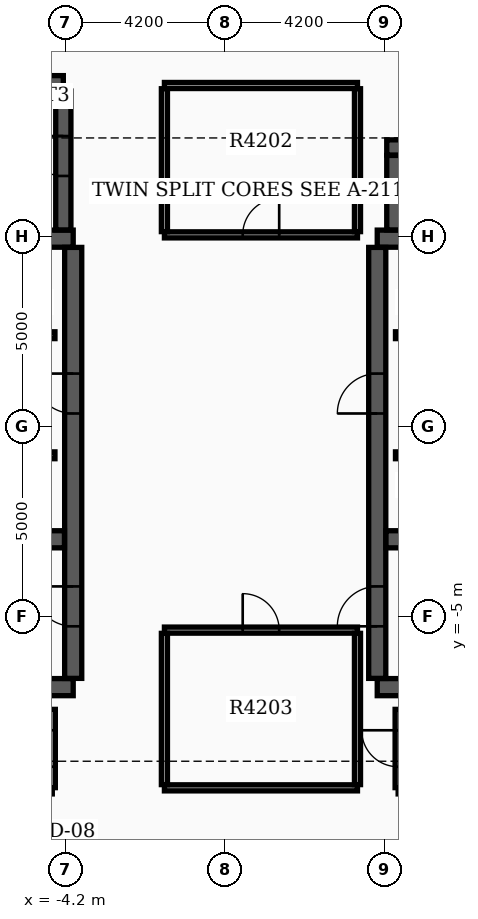
"""IFC4 building model, lengths in metres.
Left out: names, types, materials, properties, quantities, classifications, styles, units other than length and angle.
Written with IfcOpenShell. Run it as: python <this file> out.ifc"""

import sys

from ifc_helpers import new_model, si_unit, direction, frame, frame_2d, origin, place, context, subcontext, project, spatial, rectangle, extrude, element, fill, save


model = new_model("IFC4")
c1 = context("Model", 3, precision=1e-05, world=origin(), true_north=direction((0.0, 1.0)))
c2 = subcontext(c1, "Body", "Model", "MODEL_VIEW")
j1 = project(units=[si_unit("LENGTHUNIT", "METRE"), si_unit("PLANEANGLEUNIT", "RADIAN")], contexts=[c1])
p1 = place(None, origin())
s1 = spatial("IfcSite", under=j1, at=p1, CompositionType="ELEMENT")
p2 = place(p1, origin())
s2 = spatial("IfcBuilding", under=s1, at=p2, CompositionType="ELEMENT")
p3 = place(p2, frame((0.0, 0.0, 265.5)))
s3 = spatial("IfcBuildingStorey", under=s2, at=p3, CompositionType="ELEMENT", Elevation=265.5)
for number, where, z_axis, x_axis in (
    (1, (-12.4, -6.85, 0.0), (0.0, 0.0, 1.0), (1.0, 0.0, 0.0)),
    (2, (-12.4, 4.95, 0.0), (0.0, 0.0, 1.0), (1.0, 0.0, 0.0)),
):
    element("IfcWall", number, at=place(p3, frame(where, z_axis=z_axis, x_axis=x_axis)), inside=s3, PredefinedType="SHEAR", context=c2, shape_type="SweptSolid", body=[
        extrude(rectangle(XDim=8.4, YDim=0.45, at=frame_2d((4.2, 0.0))), origin(), (0.0, 0.0, 1.0), 3.7),
    ])
p4 = place(p3, frame((-4.0, -6.62, 0.0), z_axis=(0.0, 0.0, 1.0), x_axis=(0.0, 1.0, 0.0)))
e3 = element("IfcWall", 3, at=p4, inside=s3, PredefinedType="SHEAR", context=c2, shape_type="SweptSolid", body=[
    extrude(rectangle(XDim=11.34, YDim=0.45, at=frame_2d((5.67, 0.0))), origin(), (0.0, 0.0, 1.0), 3.7),
])
p5 = place(p4, frame((1.37, 0.0, 0.0)))
e4 = element("IfcOpeningElement", 4, at=p5, cuts=e3, PredefinedType="OPENING", context=c2, shape_type="SweptSolid", body=[
    extrude(rectangle(XDim=1.05, YDim=2.15, at=frame_2d((0.525, 1.075))), frame((0.0, 0.235, 0.0), z_axis=(0.0, -1.0, 0.0), x_axis=(1.0, 0.0, 0.0)), (0.0, 0.0, 1.0), 0.47),
])
p6 = place(p4, frame((6.97, 0.0, 0.0)))
e5 = element("IfcOpeningElement", 5, at=p6, cuts=e3, PredefinedType="OPENING", context=c2, shape_type="SweptSolid", body=[
    extrude(rectangle(XDim=1.05, YDim=2.15, at=frame_2d((0.525, 1.075))), frame((0.0, 0.235, 0.0), z_axis=(0.0, -1.0, 0.0), x_axis=(1.0, 0.0, 0.0)), (0.0, 0.0, 1.0), 0.47),
])
p7 = place(p3, frame((-12.17, -2.96, 0.0), z_axis=(0.0, 0.0, 1.0), x_axis=(1.0, 0.0, 0.0)))
e6 = element("IfcWall", 6, at=p7, inside=s3, PredefinedType="SHEAR", context=c2, shape_type="SweptSolid", body=[
    extrude(rectangle(XDim=7.94, YDim=0.45, at=frame_2d((3.97, 0.0))), origin(), (0.0, 0.0, 1.0), 3.7),
])
for number, where, z_axis, x_axis in (
    (7, (4.0, -6.85, 0.0), (0.0, 0.0, 1.0), (1.0, 0.0, 0.0)),
    (8, (4.0, 4.95, 0.0), (0.0, 0.0, 1.0), (1.0, 0.0, 0.0)),
):
    element("IfcWall", number, at=place(p3, frame(where, z_axis=z_axis, x_axis=x_axis)), inside=s3, PredefinedType="SHEAR", context=c2, shape_type="SweptSolid", body=[
        extrude(rectangle(XDim=8.4, YDim=0.45, at=frame_2d((4.2, 0.0))), origin(), (0.0, 0.0, 1.0), 3.7),
    ])
p8 = place(p3, frame((4.0, -6.62, 0.0), z_axis=(0.0, 0.0, 1.0), x_axis=(0.0, 1.0, 0.0)))
e9 = element("IfcWall", 9, at=p8, inside=s3, PredefinedType="SHEAR", context=c2, shape_type="SweptSolid", body=[
    extrude(rectangle(XDim=11.34, YDim=0.45, at=frame_2d((5.67, 0.0))), origin(), (0.0, 0.0, 1.0), 3.7),
])
p9 = place(p8, frame((1.37, 0.0, 0.0)))
e10 = element("IfcOpeningElement", 10, at=p9, cuts=e9, PredefinedType="OPENING", context=c2, shape_type="SweptSolid", body=[
    extrude(rectangle(XDim=1.05, YDim=2.15, at=frame_2d((0.525, 1.075))), frame((0.0, 0.235, 0.0), z_axis=(0.0, -1.0, 0.0), x_axis=(1.0, 0.0, 0.0)), (0.0, 0.0, 1.0), 0.47),
])
p10 = place(p8, frame((6.97, 0.0, 0.0)))
e11 = element("IfcOpeningElement", 11, at=p10, cuts=e9, PredefinedType="OPENING", context=c2, shape_type="SweptSolid", body=[
    extrude(rectangle(XDim=1.05, YDim=2.15, at=frame_2d((0.525, 1.075))), frame((0.0, 0.235, 0.0), z_axis=(0.0, -1.0, 0.0), x_axis=(1.0, 0.0, 0.0)), (0.0, 0.0, 1.0), 0.47),
])
p11 = place(p3, frame((4.23, -2.96, 0.0), z_axis=(0.0, 0.0, 1.0), x_axis=(1.0, 0.0, 0.0)))
e12 = element("IfcWall", 12, at=p11, inside=s3, PredefinedType="SHEAR", context=c2, shape_type="SweptSolid", body=[
    extrude(rectangle(XDim=7.94, YDim=0.45, at=frame_2d((3.97, 0.0))), origin(), (0.0, 0.0, 1.0), 3.7),
])
p12 = place(p3, frame((-12.22, 9.04, 0.0), z_axis=(0.0, 0.0, 1.0), x_axis=(1.0, 0.0, 0.0)))
e13 = element("IfcWall", 13, at=p12, inside=s3, PredefinedType="SHEAR", context=c2, shape_type="SweptSolid", body=[
    extrude(rectangle(XDim=7.96, YDim=0.4, at=frame_2d((3.98, 0.0))), origin(), (0.0, 0.0, 1.0), 3.7),
])
p13 = place(p3, frame((-4.26, 5.18, 0.0), z_axis=(0.0, 0.0, 1.0), x_axis=(0.0, 1.0, 0.0)))
e14 = element("IfcWall", 14, at=p13, inside=s3, PredefinedType="SHEAR", context=c2, shape_type="SweptSolid", body=[
    extrude(rectangle(XDim=3.655, YDim=0.4, at=frame_2d((1.828, 0.0))), origin(), (0.0, 0.0, 1.0), 3.7),
])
p14 = place(p13, frame((1.42, 0.0, 0.0)))
e15 = element("IfcOpeningElement", 15, at=p14, cuts=e14, PredefinedType="OPENING", context=c2, shape_type="SweptSolid", body=[
    extrude(rectangle(XDim=1.05, YDim=2.15, at=frame_2d((0.525, 1.075))), frame((0.0, 0.21, 0.0), z_axis=(0.0, -1.0, 0.0), x_axis=(1.0, 0.0, 0.0)), (0.0, 0.0, 1.0), 0.42),
])
p15 = place(p3, frame((4.45, 5.18, 0.0), z_axis=(0.0, 0.0, 1.0), x_axis=(0.0, 1.0, 0.0)))
e16 = element("IfcWall", 16, at=p15, inside=s3, PredefinedType="SHEAR", context=c2, shape_type="SweptSolid", body=[
    extrude(rectangle(XDim=1.96, YDim=0.4, at=frame_2d((0.98, 0.0))), origin(), (0.0, 0.0, 1.0), 3.7),
])
p16 = place(p3, frame((4.25, 7.35, 0.0), z_axis=(0.0, 0.0, 1.0), x_axis=(1.0, 0.0, 0.0)))
e17 = element("IfcWall", 17, at=p16, inside=s3, PredefinedType="SHEAR", context=c2, shape_type="SweptSolid", body=[
    extrude(rectangle(XDim=5.4, YDim=0.4, at=frame_2d((2.7, 0.0))), origin(), (0.0, 0.0, 1.0), 3.7),
])
p17 = place(p3, frame((-11.9, 2.41, 0.0), z_axis=(0.0, 0.0, 1.0), x_axis=(1.0, 0.0, 0.0)))
e18 = element("IfcWall", 18, at=p17, inside=s3, PredefinedType="SOLIDWALL", context=c2, shape_type="SweptSolid", body=[
    extrude(rectangle(XDim=7.42, YDim=0.18, at=frame_2d((3.71, 0.0))), origin(), (0.0, 0.0, 1.0), 3.17),
])
p18 = place(p17, frame((0.55, 0.0, 0.0)))
e19 = element("IfcOpeningElement", 19, at=p18, cuts=e18, PredefinedType="OPENING", context=c2, shape_type="SweptSolid", body=[
    extrude(rectangle(XDim=1.1, YDim=2.15, at=frame_2d((0.55, 1.075))), frame((0.0, 0.1, 0.0), z_axis=(0.0, -1.0, 0.0), x_axis=(1.0, 0.0, 0.0)), (0.0, 0.0, 1.0), 0.2),
])
p19 = place(p17, frame((4.9, 0.0, 0.0)))
e20 = element("IfcOpeningElement", 20, at=p19, cuts=e18, PredefinedType="OPENING", context=c2, shape_type="SweptSolid", body=[
    extrude(rectangle(XDim=0.88, YDim=2.1, at=frame_2d((0.44, 1.05))), frame((0.0, 0.1, 0.0), z_axis=(0.0, -1.0, 0.0), x_axis=(1.0, 0.0, 0.0)), (0.0, 0.0, 1.0), 0.2),
])
p20 = place(p3, frame((4.48, 2.41, 0.0), z_axis=(0.0, 0.0, 1.0), x_axis=(1.0, 0.0, 0.0)))
e21 = element("IfcWall", 21, at=p20, inside=s3, PredefinedType="SOLIDWALL", context=c2, shape_type="SweptSolid", body=[
    extrude(rectangle(XDim=7.42, YDim=0.18, at=frame_2d((3.71, 0.0))), origin(), (0.0, 0.0, 1.0), 3.17),
])
p21 = place(p20, frame((5.67, 0.0, 0.0)))
e22 = element("IfcOpeningElement", 22, at=p21, cuts=e21, PredefinedType="OPENING", context=c2, shape_type="SweptSolid", body=[
    extrude(rectangle(XDim=1.1, YDim=2.15, at=frame_2d((0.55, 1.075))), frame((0.0, 0.1, 0.0), z_axis=(0.0, -1.0, 0.0), x_axis=(1.0, 0.0, 0.0)), (0.0, 0.0, 1.0), 0.2),
])
p22 = place(p20, frame((1.6, 0.0, 0.0)))
e23 = element("IfcOpeningElement", 23, at=p22, cuts=e21, PredefinedType="OPENING", context=c2, shape_type="SweptSolid", body=[
    extrude(rectangle(XDim=0.88, YDim=2.1, at=frame_2d((0.44, 1.05))), frame((0.0, 0.1, 0.0), z_axis=(0.0, -1.0, 0.0), x_axis=(1.0, 0.0, 0.0)), (0.0, 0.0, 1.0), 0.2),
])
p23 = place(p3, frame((-11.9, -0.75, 0.0), z_axis=(0.0, 0.0, 1.0), x_axis=(1.0, 0.0, 0.0)))
e24 = element("IfcWall", 24, at=p23, inside=s3, PredefinedType="SOLIDWALL", context=c2, shape_type="SweptSolid", body=[
    extrude(rectangle(XDim=7.42, YDim=0.18, at=frame_2d((3.71, 0.0))), origin(), (0.0, 0.0, 1.0), 3.17),
])
p24 = place(p23, frame((5.75, 0.0, 0.0)))
e25 = element("IfcOpeningElement", 25, at=p24, cuts=e24, PredefinedType="OPENING", context=c2, shape_type="SweptSolid", body=[
    extrude(rectangle(XDim=1.1, YDim=2.15, at=frame_2d((0.55, 1.075))), frame((0.0, 0.1, 0.0), z_axis=(0.0, -1.0, 0.0), x_axis=(1.0, 0.0, 0.0)), (0.0, 0.0, 1.0), 0.2),
])
p25 = place(p23, frame((1.6, 0.0, 0.0)))
e26 = element("IfcOpeningElement", 26, at=p25, cuts=e24, PredefinedType="OPENING", context=c2, shape_type="SweptSolid", body=[
    extrude(rectangle(XDim=0.88, YDim=2.1, at=frame_2d((0.44, 1.05))), frame((0.0, 0.1, 0.0), z_axis=(0.0, -1.0, 0.0), x_axis=(1.0, 0.0, 0.0)), (0.0, 0.0, 1.0), 0.2),
])
p26 = place(p3, frame((4.48, -0.75, 0.0), z_axis=(0.0, 0.0, 1.0), x_axis=(1.0, 0.0, 0.0)))
e27 = element("IfcWall", 27, at=p26, inside=s3, PredefinedType="SOLIDWALL", context=c2, shape_type="SweptSolid", body=[
    extrude(rectangle(XDim=7.42, YDim=0.18, at=frame_2d((3.71, 0.0))), origin(), (0.0, 0.0, 1.0), 3.17),
])
p27 = place(p26, frame((3.92, 0.0, 0.0)))
e28 = element("IfcOpeningElement", 28, at=p27, cuts=e27, PredefinedType="OPENING", context=c2, shape_type="SweptSolid", body=[
    extrude(rectangle(XDim=1.1, YDim=2.15, at=frame_2d((0.55, 1.075))), frame((0.0, 0.1, 0.0), z_axis=(0.0, -1.0, 0.0), x_axis=(1.0, 0.0, 0.0)), (0.0, 0.0, 1.0), 0.2),
])
p28 = place(p26, frame((5.82, 0.0, 0.0)))
e29 = element("IfcOpeningElement", 29, at=p28, cuts=e27, PredefinedType="OPENING", context=c2, shape_type="SweptSolid", body=[
    extrude(rectangle(XDim=1.1, YDim=2.15, at=frame_2d((0.55, 1.075))), frame((0.0, 0.1, 0.0), z_axis=(0.0, -1.0, 0.0), x_axis=(1.0, 0.0, 0.0)), (0.0, 0.0, 1.0), 0.2),
])
p29 = place(p26, frame((1.6, 0.0, 0.0)))
e30 = element("IfcOpeningElement", 30, at=p29, cuts=e27, PredefinedType="OPENING", context=c2, shape_type="SweptSolid", body=[
    extrude(rectangle(XDim=0.88, YDim=2.1, at=frame_2d((0.44, 1.05))), frame((0.0, 0.1, 0.0), z_axis=(0.0, -1.0, 0.0), x_axis=(1.0, 0.0, 0.0)), (0.0, 0.0, 1.0), 0.2),
])
p30 = place(p3, frame((-1.6, 5.05, 0.0), z_axis=(0.0, 0.0, 1.0), x_axis=(1.0, 0.0, 0.0)))
e31 = element("IfcWall", 31, at=p30, inside=s3, PredefinedType="PARTITIONING", context=c2, shape_type="SweptSolid", body=[
    extrude(rectangle(XDim=5.08, YDim=0.16, at=frame_2d((2.54, 0.0))), origin(), (0.0, 0.0, 1.0), 3.17),
])
p31 = place(p30, frame((2.06, 0.0, 0.0)))
e32 = element("IfcOpeningElement", 32, at=p31, cuts=e31, PredefinedType="OPENING", context=c2, shape_type="SweptSolid", body=[
    extrude(rectangle(XDim=0.96, YDim=2.15, at=frame_2d((0.48, 1.075))), frame((0.0, 0.09, 0.0), z_axis=(0.0, -1.0, 0.0), x_axis=(1.0, 0.0, 0.0)), (0.0, 0.0, 1.0), 0.18),
])
p32 = place(p3, frame((-1.6, 8.98, 0.0), z_axis=(0.0, 0.0, 1.0), x_axis=(1.0, 0.0, 0.0)))
e33 = element("IfcWall", 33, at=p32, inside=s3, PredefinedType="PARTITIONING", context=c2, shape_type="SweptSolid", body=[
    extrude(rectangle(XDim=5.08, YDim=0.16, at=frame_2d((2.54, 0.0))), origin(), (0.0, 0.0, 1.0), 3.17),
])
for number, where, z_axis, x_axis in (
    (34, (-1.6, 5.135, 0.0), (0.0, 0.0, 1.0), (0.0, 1.0, 0.0)),
    (35, (3.48, 5.135, 0.0), (0.0, 0.0, 1.0), (0.0, 1.0, 0.0)),
):
    element("IfcWall", number, at=place(p3, frame(where, z_axis=z_axis, x_axis=x_axis)), inside=s3, PredefinedType="PARTITIONING", context=c2, shape_type="SweptSolid", body=[
        extrude(rectangle(XDim=3.76, YDim=0.16, at=frame_2d((1.88, 0.0))), origin(), (0.0, 0.0, 1.0), 3.17),
    ])
p33 = place(p3, frame((-1.6, -9.5, 0.0), z_axis=(0.0, 0.0, 1.0), x_axis=(1.0, 0.0, 0.0)))
e36 = element("IfcWall", 36, at=p33, inside=s3, PredefinedType="PARTITIONING", context=c2, shape_type="SweptSolid", body=[
    extrude(rectangle(XDim=5.08, YDim=0.16, at=frame_2d((2.54, 0.0))), origin(), (0.0, 0.0, 1.0), 3.17),
])
p34 = place(p3, frame((-1.6, -5.35, 0.0), z_axis=(0.0, 0.0, 1.0), x_axis=(1.0, 0.0, 0.0)))
e37 = element("IfcWall", 37, at=p34, inside=s3, PredefinedType="PARTITIONING", context=c2, shape_type="SweptSolid", body=[
    extrude(rectangle(XDim=5.08, YDim=0.16, at=frame_2d((2.54, 0.0))), origin(), (0.0, 0.0, 1.0), 3.17),
])
p35 = place(p34, frame((2.06, 0.0, 0.0)))
e38 = element("IfcOpeningElement", 38, at=p35, cuts=e37, PredefinedType="OPENING", context=c2, shape_type="SweptSolid", body=[
    extrude(rectangle(XDim=0.96, YDim=2.15, at=frame_2d((0.48, 1.075))), frame((0.0, 0.09, 0.0), z_axis=(0.0, -1.0, 0.0), x_axis=(1.0, 0.0, 0.0)), (0.0, 0.0, 1.0), 0.18),
])
for number, where, z_axis, x_axis in (
    (39, (-1.6, -9.415, 0.0), (0.0, 0.0, 1.0), (0.0, 1.0, 0.0)),
    (40, (3.48, -9.415, 0.0), (0.0, 0.0, 1.0), (0.0, 1.0, 0.0)),
):
    element("IfcWall", number, at=place(p3, frame(where, z_axis=z_axis, x_axis=x_axis)), inside=s3, PredefinedType="PARTITIONING", context=c2, shape_type="SweptSolid", body=[
        extrude(rectangle(XDim=3.98, YDim=0.16, at=frame_2d((1.99, 0.0))), origin(), (0.0, 0.0, 1.0), 3.17),
    ])
p36 = place(p3, frame((4.55, -9.58, 0.0), z_axis=(0.0, 0.0, 1.0), x_axis=(1.0, 0.0, 0.0)))
e41 = element("IfcWall", 41, at=p36, inside=s3, PredefinedType="PARTITIONING", context=c2, shape_type="SweptSolid", body=[
    extrude(rectangle(XDim=8.1, YDim=0.16, at=frame_2d((4.05, 0.0))), origin(), (0.0, 0.0, 1.0), 3.17),
])
p37 = place(p3, frame((4.55, -9.495, 0.0), z_axis=(0.0, 0.0, 1.0), x_axis=(0.0, 1.0, 0.0)))
e42 = element("IfcWall", 42, at=p37, inside=s3, PredefinedType="PARTITIONING", context=c2, shape_type="SweptSolid", body=[
    extrude(rectangle(XDim=2.06, YDim=0.16, at=frame_2d((1.03, 0.0))), origin(), (0.0, 0.0, 1.0), 3.17),
])
p38 = place(p37, frame((0.55, 0.0, 0.0)))
e43 = element("IfcOpeningElement", 43, at=p38, cuts=e42, PredefinedType="OPENING", context=c2, shape_type="SweptSolid", body=[
    extrude(rectangle(XDim=0.96, YDim=2.15, at=frame_2d((0.48, 1.075))), frame((0.0, 0.09, 0.0), z_axis=(0.0, -1.0, 0.0), x_axis=(1.0, 0.0, 0.0)), (0.0, 0.0, 1.0), 0.18),
])
p39 = place(p3, frame((-4.55, -9.495, 0.0), z_axis=(0.0, 0.0, 1.0), x_axis=(0.0, 1.0, 0.0)))
e44 = element("IfcWall", 44, at=p39, inside=s3, PredefinedType="PARTITIONING", context=c2, shape_type="SweptSolid", body=[
    extrude(rectangle(XDim=2.06, YDim=0.16, at=frame_2d((1.03, 0.0))), origin(), (0.0, 0.0, 1.0), 3.17),
])
p40 = place(p39, frame((0.55, 0.0, 0.0)))
e45 = element("IfcOpeningElement", 45, at=p40, cuts=e44, PredefinedType="OPENING", context=c2, shape_type="SweptSolid", body=[
    extrude(rectangle(XDim=0.96, YDim=2.15, at=frame_2d((0.48, 1.075))), frame((0.0, 0.09, 0.0), z_axis=(0.0, -1.0, 0.0), x_axis=(1.0, 0.0, 0.0)), (0.0, 0.0, 1.0), 0.18),
])
p41 = place(p5, origin())
e46 = element("IfcDoor", 46, at=p41, inside=s3, OperationType="SINGLE_SWING_RIGHT", PredefinedType="DOOR", context=c2, shape_type="SweptSolid", body=[
    extrude(rectangle(XDim=1.05, YDim=2.15, at=frame_2d((0.525, 1.075))), frame((0.0, 0.025, 0.0), z_axis=(0.0, -1.0, 0.0), x_axis=(1.0, 0.0, 0.0)), (0.0, 0.0, 1.0), 0.05),
])
fill(e4, e46)
p42 = place(p9, origin())
e47 = element("IfcDoor", 47, at=p42, inside=s3, OperationType="SINGLE_SWING_LEFT", PredefinedType="DOOR", context=c2, shape_type="SweptSolid", body=[
    extrude(rectangle(XDim=1.05, YDim=2.15, at=frame_2d((0.525, 1.075))), frame((0.0, 0.025, 0.0), z_axis=(0.0, -1.0, 0.0), x_axis=(1.0, 0.0, 0.0)), (0.0, 0.0, 1.0), 0.05),
])
fill(e10, e47)
p43 = place(p6, origin())
e48 = element("IfcDoor", 48, at=p43, inside=s3, OperationType="SINGLE_SWING_RIGHT", PredefinedType="DOOR", context=c2, shape_type="SweptSolid", body=[
    extrude(rectangle(XDim=1.05, YDim=2.15, at=frame_2d((0.525, 1.075))), frame((0.0, 0.025, 0.0), z_axis=(0.0, -1.0, 0.0), x_axis=(1.0, 0.0, 0.0)), (0.0, 0.0, 1.0), 0.05),
])
fill(e5, e48)
p44 = place(p10, origin())
e49 = element("IfcDoor", 49, at=p44, inside=s3, OperationType="SINGLE_SWING_LEFT", PredefinedType="DOOR", context=c2, shape_type="SweptSolid", body=[
    extrude(rectangle(XDim=1.05, YDim=2.15, at=frame_2d((0.525, 1.075))), frame((0.0, 0.025, 0.0), z_axis=(0.0, -1.0, 0.0), x_axis=(1.0, 0.0, 0.0)), (0.0, 0.0, 1.0), 0.05),
])
fill(e11, e49)
p45 = place(p14, origin())
e50 = element("IfcDoor", 50, at=p45, inside=s3, OperationType="SINGLE_SWING_RIGHT", PredefinedType="DOOR", context=c2, shape_type="SweptSolid", body=[
    extrude(rectangle(XDim=1.05, YDim=2.15, at=frame_2d((0.525, 1.075))), frame((0.0, 0.025, 0.0), z_axis=(0.0, -1.0, 0.0), x_axis=(1.0, 0.0, 0.0)), (0.0, 0.0, 1.0), 0.05),
])
fill(e15, e50)
p46 = place(p31, origin())
e51 = element("IfcDoor", 51, at=p46, inside=s3, OperationType="SINGLE_SWING_RIGHT", PredefinedType="DOOR", context=c2, shape_type="SweptSolid", body=[
    extrude(rectangle(XDim=0.96, YDim=2.15, at=frame_2d((0.48, 1.075))), frame((0.0, 0.025, 0.0), z_axis=(0.0, -1.0, 0.0), x_axis=(1.0, 0.0, 0.0)), (0.0, 0.0, 1.0), 0.05),
])
fill(e32, e51)
p47 = place(p35, origin())
e52 = element("IfcDoor", 52, at=p47, inside=s3, OperationType="SINGLE_SWING_LEFT", PredefinedType="DOOR", context=c2, shape_type="SweptSolid", body=[
    extrude(rectangle(XDim=0.96, YDim=2.15, at=frame_2d((0.48, 1.075))), frame((0.0, 0.025, 0.0), z_axis=(0.0, -1.0, 0.0), x_axis=(1.0, 0.0, 0.0)), (0.0, 0.0, 1.0), 0.05),
])
fill(e38, e52)
p48 = place(p38, origin())
e53 = element("IfcDoor", 53, at=p48, inside=s3, OperationType="SINGLE_SWING_RIGHT", PredefinedType="DOOR", context=c2, shape_type="SweptSolid", body=[
    extrude(rectangle(XDim=0.96, YDim=2.15, at=frame_2d((0.48, 1.075))), frame((0.0, 0.025, 0.0), z_axis=(0.0, -1.0, 0.0), x_axis=(1.0, 0.0, 0.0)), (0.0, 0.0, 1.0), 0.05),
])
fill(e43, e53)
p49 = place(p40, origin())
e54 = element("IfcDoor", 54, at=p49, inside=s3, OperationType="SINGLE_SWING_LEFT", PredefinedType="DOOR", context=c2, shape_type="SweptSolid", body=[
    extrude(rectangle(XDim=0.96, YDim=2.15, at=frame_2d((0.48, 1.075))), frame((0.0, 0.025, 0.0), z_axis=(0.0, -1.0, 0.0), x_axis=(1.0, 0.0, 0.0)), (0.0, 0.0, 1.0), 0.05),
])
fill(e45, e54)
save(model, sys.argv[1])
